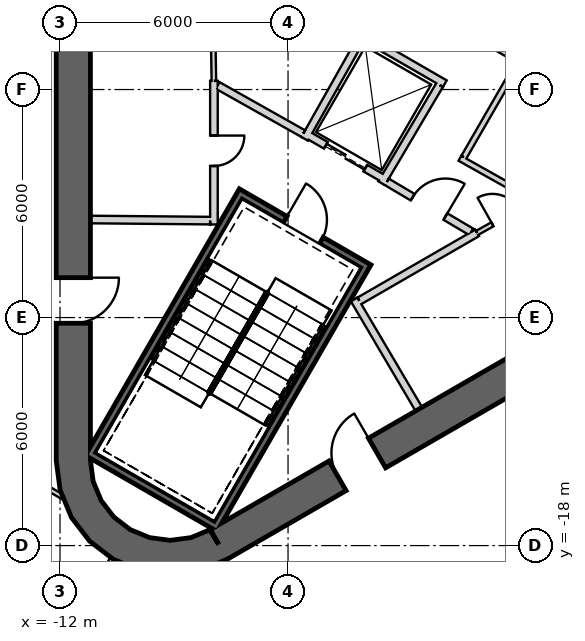
"""IFC4 building model, lengths in metres.
Left out: names, types, materials, properties, quantities, classifications, styles, units other than length and angle.
Written with IfcOpenShell. Run it as: python <this file> out.ifc"""

import sys

from ifc_helpers import new_model, si_unit, direction, frame, frame_2d, origin, place, context, subcontext, project, spatial, polyline, rectangle, outline, extrude, element, fill, save


model = new_model("IFC4")
c1 = context("Model", 3, precision=1e-05, world=origin(), true_north=direction((0.0, 1.0)))
c2 = subcontext(c1, "Body", "Model", "MODEL_VIEW")
j1 = project(units=[si_unit("LENGTHUNIT", "METRE"), si_unit("PLANEANGLEUNIT", "RADIAN")], contexts=[c1])
p1 = place(None, origin())
s1 = spatial("IfcSite", under=j1, at=p1, CompositionType="ELEMENT")
p2 = place(p1, origin())
s2 = spatial("IfcBuilding", under=s1, at=p2, CompositionType="ELEMENT")
p3 = place(p2, frame((0.0, 0.0, -5.5)))
s3 = spatial("IfcBuildingStorey", under=s2, at=p3, CompositionType="ELEMENT", Elevation=-5.5)
p4 = place(p3, frame((33.512, -16.71, 0.0), z_axis=(0.0, 0.0, 1.0), x_axis=(-0.865991212225, -0.500059216843, 0.0)))
e1 = element("IfcWall", 1, at=p4, inside=s3, PredefinedType="SHEAR", context=c2, shape_type="SweptSolid", body=[
    extrude(rectangle(XDim=41.333, YDim=1.0, at=frame_2d((20.667, 0.0))), origin(), (0.0, 0.0, 1.0), 5.5),
])
p5 = place(p3, frame((-11.65, 15.762, 0.0), z_axis=(0.0, 0.0, 1.0), x_axis=(0.0, -1.0, 0.0)))
e2 = element("IfcWall", 2, at=p5, inside=s3, PredefinedType="SHEAR", context=c2, shape_type="SweptSolid", body=[
    extrude(rectangle(XDim=31.523, YDim=0.9, at=frame_2d((15.762, 0.0))), origin(), (0.0, 0.0, 1.0), 5.5),
])
p6 = place(p5, frame((3.612, 0.0, 0.0)))
e3 = element("IfcOpeningElement", 3, at=p6, cuts=e2, PredefinedType="OPENING", context=c2, shape_type="SweptSolid", body=[
    extrude(rectangle(XDim=1.2, YDim=2.4, at=frame_2d((0.6, 1.2))), frame((0.0, 0.46, 0.0), z_axis=(0.0, -1.0, 0.0), x_axis=(1.0, 0.0, 0.0)), (0.0, 0.0, 1.0), 0.92),
])
p7 = place(p5, frame((26.712, 0.0, 0.0)))
e4 = element("IfcOpeningElement", 4, at=p7, cuts=e2, PredefinedType="OPENING", context=c2, shape_type="SweptSolid", body=[
    extrude(rectangle(XDim=1.2, YDim=2.4, at=frame_2d((0.6, 1.2))), frame((0.0, 0.46, 0.0), z_axis=(0.0, -1.0, 0.0), x_axis=(1.0, 0.0, 0.0)), (0.0, 0.0, 1.0), 0.92),
])
p8 = place(p3, frame((-7.825, -17.97, 0.0), z_axis=(0.0, 0.0, 1.0), x_axis=(0.866028369851, 0.499994862586, 0.0)))
e5 = element("IfcWall", 5, at=p8, inside=s3, PredefinedType="SHEAR", context=c2, shape_type="SweptSolid", body=[
    extrude(rectangle(XDim=31.523, YDim=0.9, at=frame_2d((15.762, 0.0))), origin(), (0.0, 0.0, 1.0), 5.5),
])
p9 = place(p8, frame((17.862, 0.0, 0.0)))
e6 = element("IfcOpeningElement", 6, at=p9, cuts=e5, PredefinedType="OPENING", context=c2, shape_type="SweptSolid", body=[
    extrude(rectangle(XDim=1.2, YDim=2.4, at=frame_2d((0.6, 1.2))), frame((0.0, 0.46, 0.0), z_axis=(0.0, -1.0, 0.0), x_axis=(1.0, 0.0, 0.0)), (0.0, 0.0, 1.0), 0.92),
])
p10 = place(p8, frame((20.562, 0.0, 0.0)))
e7 = element("IfcOpeningElement", 7, at=p10, cuts=e5, PredefinedType="OPENING", context=c2, shape_type="SweptSolid", body=[
    extrude(rectangle(XDim=1.2, YDim=2.4, at=frame_2d((0.6, 1.2))), frame((0.0, 0.46, 0.0), z_axis=(0.0, -1.0, 0.0), x_axis=(1.0, 0.0, 0.0)), (0.0, 0.0, 1.0), 0.92),
])
p11 = place(p8, frame((26.712, 0.0, 0.0)))
e8 = element("IfcOpeningElement", 8, at=p11, cuts=e5, PredefinedType="OPENING", context=c2, shape_type="SweptSolid", body=[
    extrude(rectangle(XDim=1.2, YDim=2.4, at=frame_2d((0.6, 1.2))), frame((0.0, 0.46, 0.0), z_axis=(0.0, -1.0, 0.0), x_axis=(1.0, 0.0, 0.0)), (0.0, 0.0, 1.0), 0.92),
])
p12 = place(p8, frame((3.612, 0.0, 0.0)))
e9 = element("IfcOpeningElement", 9, at=p12, cuts=e5, PredefinedType="OPENING", context=c2, shape_type="SweptSolid", body=[
    extrude(rectangle(XDim=1.2, YDim=2.4, at=frame_2d((0.6, 1.2))), frame((0.0, 0.46, 0.0), z_axis=(0.0, -1.0, 0.0), x_axis=(1.0, 0.0, 0.0)), (0.0, 0.0, 1.0), 0.92),
])
p13 = place(p3, origin())
e10 = element("IfcWall", 10, at=p13, inside=s3, PredefinedType="SHEAR", context=c2, shape_type="SweptSolid", body=[
    extrude(outline(polyline([(-12.1, -15.762), (-11.998, -16.538), (-11.698, -17.262), (-11.221, -17.883), (-10.6, -18.36), (-9.876, -18.659), (-9.1, -18.762), (-8.323, -18.659), (-7.6, -18.36), (-8.05, -17.58), (-8.556, -17.79), (-9.1, -17.862), (-9.644, -17.79), (-10.15, -17.58), (-10.585, -17.247), (-10.919, -16.812), (-11.128, -16.305), (-11.2, -15.762), (-12.1, -15.762)])), origin(), (0.0, 0.0, 1.0), 5.5),
])
p14 = place(p3, frame((-3.905, -10.563, -0.4), z_axis=(0.0, 0.0, 1.0), x_axis=(-0.500012932018, -0.866017937352, 0.0)))
e11 = element("IfcWall", 11, at=p14, inside=s3, PredefinedType="SHEAR", context=c2, shape_type="SweptSolid", body=[
    extrude(rectangle(XDim=8.1, YDim=0.2, at=frame_2d((4.05, 0.0))), origin(), (0.0, 0.0, 1.0), 5.5),
])
p15 = place(p3, frame((-11.282, -15.541, -0.4), z_axis=(0.0, 0.0, 1.0), x_axis=(0.866000483506, -0.500043160704, 0.0)))
e12 = element("IfcWall", 12, at=p15, inside=s3, PredefinedType="SHEAR", context=c2, shape_type="SweptSolid", body=[
    extrude(rectangle(XDim=3.8, YDim=0.2, at=frame_2d((1.9, 0.0))), origin(), (0.0, 0.0, 1.0), 5.5),
])
p16 = place(p3, frame((-7.196, -8.663, -0.4), z_axis=(0.0, 0.0, 1.0), x_axis=(-0.499997992926, -0.866026562566, 0.0)))
e13 = element("IfcWall", 13, at=p16, inside=s3, PredefinedType="SHEAR", context=c2, shape_type="SweptSolid", body=[
    extrude(rectangle(XDim=7.9, YDim=0.2, at=frame_2d((3.95, 0.0))), origin(), (0.0, 0.0, 1.0), 5.5),
])
p17 = place(p3, frame((-4.041, -10.599, -0.4), z_axis=(0.0, 0.0, 1.0), x_axis=(-0.866047807691, 0.499961193289, 0.0)))
e14 = element("IfcWall", 14, at=p17, inside=s3, PredefinedType="SHEAR", context=c2, shape_type="SweptSolid", body=[
    extrude(rectangle(XDim=3.6, YDim=0.2, at=frame_2d((1.8, 0.0))), origin(), (0.0, 0.0, 1.0), 5.5),
])
p18 = place(p17, frame((1.25, 0.0, 0.4)))
e15 = element("IfcOpeningElement", 15, at=p18, cuts=e14, PredefinedType="OPENING", context=c2, shape_type="SweptSolid", body=[
    extrude(rectangle(XDim=1.1, YDim=2.1, at=frame_2d((0.55, 1.05))), frame((0.0, 0.11, 0.0), z_axis=(0.0, -1.0, 0.0), x_axis=(1.0, 0.0, 0.0)), (0.0, 0.0, 1.0), 0.22),
])
p19 = place(p3, frame((-3.446, -8.368, 0.0), z_axis=(0.0, 0.0, 1.0), x_axis=(-0.866024647952, 0.500001309137, 0.0)))
e16 = element("IfcWall", 16, at=p19, inside=s3, PredefinedType="PLUMBINGWALL", context=c2, shape_type="SweptSolid", body=[
    extrude(rectangle(XDim=2.4, YDim=0.2, at=frame_2d((1.2, 0.0))), origin(), (0.0, 0.0, 1.0), 5.1),
])
p20 = place(p19, frame((0.6, 0.0, 0.0)))
e17 = element("IfcOpeningElement", 17, at=p20, cuts=e16, PredefinedType="OPENING", context=c2, shape_type="SweptSolid", body=[
    extrude(rectangle(XDim=1.2, YDim=2.4, at=frame_2d((0.6, 1.2))), frame((0.0, 0.11, 0.0), z_axis=(0.0, -1.0, 0.0), x_axis=(1.0, 0.0, 0.0)), (0.0, 0.0, 1.0), 0.22),
])
p21 = place(p3, frame((-5.562, -7.296, 0.0), z_axis=(0.0, 0.0, 1.0), x_axis=(0.491358283181, 0.870957540612, 0.0)))
e18 = element("IfcWall", 18, at=p21, inside=s3, PredefinedType="PLUMBINGWALL", context=c2, shape_type="SweptSolid", body=[
    extrude(rectangle(XDim=3.2, YDim=0.2, at=frame_2d((1.6, 0.0))), origin(), (0.0, 0.0, 1.0), 5.1),
])
p22 = place(p3, frame((-3.953, -4.646, 0.0), z_axis=(0.0, 0.0, 1.0), x_axis=(0.866024647952, -0.500001309137, 0.0)))
e19 = element("IfcWall", 19, at=p22, inside=s3, PredefinedType="PLUMBINGWALL", context=c2, shape_type="SweptSolid", body=[
    extrude(rectangle(XDim=2.4, YDim=0.2, at=frame_2d((1.2, 0.0))), origin(), (0.0, 0.0, 1.0), 5.1),
])
p23 = place(p3, frame((-2.012, -5.882, 0.0), z_axis=(0.0, 0.0, 1.0), x_axis=(-0.508619639323, -0.860991325447, 0.0)))
e20 = element("IfcWall", 20, at=p23, inside=s3, PredefinedType="PLUMBINGWALL", context=c2, shape_type="SweptSolid", body=[
    extrude(rectangle(XDim=3.0, YDim=0.2, at=frame_2d((1.5, 0.0))), origin(), (0.0, 0.0, 1.0), 5.1),
])
p24 = place(p3, frame((-7.95, -9.55, 0.0), z_axis=(0.0, 0.0, 1.0), x_axis=(0.0, 1.0, 0.0)))
e21 = element("IfcWall", 21, at=p24, inside=s3, PredefinedType="PARTITIONING", context=c2, shape_type="SweptSolid", body=[
    extrude(rectangle(XDim=3.778, YDim=0.2, at=frame_2d((1.889, 0.0))), origin(), (0.0, 0.0, 1.0), 5.1),
])
p25 = place(p24, frame((1.539, 0.0, 0.0)))
e22 = element("IfcOpeningElement", 22, at=p25, cuts=e21, PredefinedType="OPENING", context=c2, shape_type="SweptSolid", body=[
    extrude(rectangle(XDim=0.8, YDim=2.1, at=frame_2d((0.4, 1.05))), frame((0.0, 0.11, 0.0), z_axis=(0.0, -1.0, 0.0), x_axis=(1.0, 0.0, 0.0)), (0.0, 0.0, 1.0), 0.22),
])
p26 = place(p3, frame((-11.2, -9.42, 0.0), z_axis=(0.0, 0.0, 1.0), x_axis=(0.999957467379, -0.009222983926, 0.0)))
e23 = element("IfcWall", 23, at=p26, inside=s3, PredefinedType="PARTITIONING", context=c2, shape_type="SweptSolid", body=[
    extrude(rectangle(XDim=3.15, YDim=0.2, at=frame_2d((1.575, 0.0))), origin(), (0.0, 0.0, 1.0), 5.1),
])
p27 = place(p3, frame((-7.98, -4.05, 0.0), z_axis=(0.0, 0.0, 1.0), x_axis=(0.016723387416, -0.999860154378, 0.0)))
e24 = element("IfcWall", 24, at=p27, inside=s3, PredefinedType="PARTITIONING", context=c2, shape_type="SweptSolid", body=[
    extrude(rectangle(XDim=1.723, YDim=0.12, at=frame_2d((0.861, 0.0))), origin(), (0.0, 0.0, 1.0), 5.1),
])
p28 = place(p3, frame((-4.26, -11.524, 0.0), z_axis=(0.0, 0.0, 1.0), x_axis=(0.507997497166, -0.861358544901, 0.0)))
e25 = element("IfcWall", 25, at=p28, inside=s3, PredefinedType="PARTITIONING", context=c2, shape_type="SweptSolid", body=[
    extrude(rectangle(XDim=3.35, YDim=0.2, at=frame_2d((1.675, 0.0))), origin(), (0.0, 0.0, 1.0), 5.1),
])
p29 = place(p3, frame((-1.024, -9.771, 0.0), z_axis=(0.0, 0.0, 1.0), x_axis=(-0.866029903013, -0.499992207027, 0.0)))
e26 = element("IfcWall", 26, at=p29, inside=s3, PredefinedType="PARTITIONING", context=c2, shape_type="SweptSolid", body=[
    extrude(rectangle(XDim=3.578, YDim=0.2, at=frame_2d((1.789, 0.0))), origin(), (0.0, 0.0, 1.0), 5.1),
])
p30 = place(p3, frame((0.478, -8.928, 0.0), z_axis=(0.0, 0.0, 1.0), x_axis=(-0.871968924608, -0.489561226527, 0.0)))
e27 = element("IfcWall", 27, at=p30, inside=s3, PredefinedType="PARTITIONING", context=c2, shape_type="SweptSolid", body=[
    extrude(rectangle(XDim=1.722, YDim=0.12, at=frame_2d((0.861, 0.0))), origin(), (0.0, 0.0, 1.0), 5.1),
])
p31 = place(p30, frame((0.461, 0.0, 0.0)))
e28 = element("IfcOpeningElement", 28, at=p31, cuts=e27, PredefinedType="OPENING", context=c2, shape_type="SweptSolid", body=[
    extrude(rectangle(XDim=0.8, YDim=2.1, at=frame_2d((0.4, 1.05))), frame((0.0, 0.07, 0.0), z_axis=(0.0, -1.0, 0.0), x_axis=(1.0, 0.0, 0.0)), (0.0, 0.0, 1.0), 0.14),
])
p32 = place(p3, frame((-7.85, -5.893, 0.0), z_axis=(0.0, 0.0, 1.0), x_axis=(0.871350695252, -0.490660744185, 0.0)))
e29 = element("IfcWall", 29, at=p32, inside=s3, PredefinedType="PARTITIONING", context=c2, shape_type="SweptSolid", body=[
    extrude(rectangle(XDim=2.582, YDim=0.2, at=frame_2d((1.291, 0.0))), origin(), (0.0, 0.0, 1.0), 5.1),
])
p33 = place(p3, frame((-3.401, -8.43, 0.0), z_axis=(0.0, 0.0, 1.0), x_axis=(0.860630814782, -0.509229418482, 0.0)))
e30 = element("IfcWall", 30, at=p33, inside=s3, PredefinedType="PARTITIONING", context=c2, shape_type="SweptSolid", body=[
    extrude(rectangle(XDim=2.582, YDim=0.2, at=frame_2d((1.291, 0.0))), origin(), (0.0, 0.0, 1.0), 5.1),
])
p34 = place(p33, frame((0.791, 0.0, 0.0)))
e31 = element("IfcOpeningElement", 31, at=p34, cuts=e30, PredefinedType="OPENING", context=c2, shape_type="SweptSolid", body=[
    extrude(rectangle(XDim=1.0, YDim=2.1, at=frame_2d((0.5, 1.05))), frame((0.0, 0.11, 0.0), z_axis=(0.0, -1.0, 0.0), x_axis=(1.0, 0.0, 0.0)), (0.0, 0.0, 1.0), 0.22),
])
p35 = place(p3, frame((-1.477, -7.808, 0.0), z_axis=(0.0, 0.0, 1.0), x_axis=(0.871822901869, -0.48982122022, 0.0)))
e32 = element("IfcWall", 32, at=p35, inside=s3, PredefinedType="PLUMBINGWALL", context=c2, shape_type="SweptSolid", body=[
    extrude(rectangle(XDim=2.24, YDim=0.15, at=frame_2d((1.12, 0.0))), origin(), (0.0, 0.0, 1.0), 5.1),
])
p36 = place(p3, frame((0.126, -5.182, 0.0), z_axis=(0.0, 0.0, 1.0), x_axis=(-0.499990139034, -0.866031096941, 0.0)))
e33 = element("IfcWall", 33, at=p36, inside=s3, PredefinedType="PLUMBINGWALL", context=c2, shape_type="SweptSolid", body=[
    extrude(rectangle(XDim=3.0, YDim=0.15, at=frame_2d((1.5, 0.0))), origin(), (0.0, 0.0, 1.0), 5.1),
])
p37 = place(p3, frame((-1.514, -4.322, 0.0), z_axis=(0.0, 0.0, 1.0), x_axis=(0.866000072607, -0.50004387232, 0.0)))
e34 = element("IfcWall", 34, at=p37, inside=s3, PredefinedType="PLUMBINGWALL", context=c2, shape_type="SweptSolid", body=[
    extrude(rectangle(XDim=1.775, YDim=0.15, at=frame_2d((0.888, 0.0))), origin(), (0.0, 0.0, 1.0), 5.1),
])
p38 = place(p3, frame((-16.19, -28.077, 0.0), z_axis=(0.0, 0.0, 1.0), x_axis=(0.866271440356, 0.499573609816, 0.0)))
e35 = element("IfcWall", 35, at=p38, inside=s3, PredefinedType="PARTITIONING", context=c2, shape_type="SweptSolid", body=[
    extrude(rectangle(XDim=20.117, YDim=0.12, at=frame_2d((10.059, 0.0))), origin(), (0.0, 0.0, 1.0), 4.07),
])
p39 = place(p38, frame((9.397, 0.0, 0.0)))
e36 = element("IfcOpeningElement", 36, at=p39, cuts=e35, PredefinedType="OPENING", context=c2, shape_type="SweptSolid", body=[
    extrude(rectangle(XDim=1.0, YDim=2.1, at=frame_2d((0.5, 1.05))), frame((0.0, 0.07, 0.0), z_axis=(0.0, -1.0, 0.0), x_axis=(1.0, 0.0, 0.0)), (0.0, 0.0, 1.0), 0.14),
])
p40 = place(p38, frame((2.53, 0.0, 0.0)))
e37 = element("IfcOpeningElement", 37, at=p40, cuts=e35, PredefinedType="OPENING", context=c2, shape_type="SweptSolid", body=[
    extrude(rectangle(XDim=1.0, YDim=2.1, at=frame_2d((0.5, 1.05))), frame((0.0, 0.07, 0.0), z_axis=(0.0, -1.0, 0.0), x_axis=(1.0, 0.0, 0.0)), (0.0, 0.0, 1.0), 0.14),
])
p41 = place(p3, frame((-16.2, -14.226, 0.0), z_axis=(0.0, 0.0, 1.0), x_axis=(0.863501067027, -0.504347010741, 0.0)))
e38 = element("IfcWall", 38, at=p41, inside=s3, PredefinedType="PARTITIONING", context=c2, shape_type="SweptSolid", body=[
    extrude(rectangle(XDim=5.166, YDim=0.12, at=frame_2d((2.583, 0.0))), origin(), (0.0, 0.0, 1.0), 4.18),
])
p42 = place(p3, frame((-10.549, -18.212, 0.0), z_axis=(0.0, 0.0, 1.0), x_axis=(-0.500006121477, -0.866021869519, 0.0)))
e39 = element("IfcWall", 39, at=p42, inside=s3, PredefinedType="PARTITIONING", context=c2, shape_type="SweptSolid", body=[
    extrude(rectangle(XDim=4.42, YDim=0.12, at=frame_2d((2.21, 0.0))), origin(), (0.0, 0.0, 1.0), 4.07),
])
p43 = place(p18, origin())
e40 = element("IfcDoor", 40, at=p43, inside=s3, OperationType="SINGLE_SWING_RIGHT", PredefinedType="USERDEFINED", context=c2, shape_type="SweptSolid", body=[
    extrude(rectangle(XDim=1.1, YDim=2.1, at=frame_2d((0.55, 1.05))), frame((0.0, 0.025, 0.0), z_axis=(0.0, -1.0, 0.0), x_axis=(1.0, 0.0, 0.0)), (0.0, 0.0, 1.0), 0.05),
])
fill(e15, e40)
p44 = place(p34, origin())
e41 = element("IfcDoor", 41, at=p44, inside=s3, OperationType="SINGLE_SWING_RIGHT", PredefinedType="USERDEFINED", context=c2, shape_type="SweptSolid", body=[
    extrude(rectangle(XDim=1.0, YDim=2.1, at=frame_2d((0.5, 1.05))), frame((0.0, 0.025, 0.0), z_axis=(0.0, -1.0, 0.0), x_axis=(1.0, 0.0, 0.0)), (0.0, 0.0, 1.0), 0.05),
])
fill(e31, e41)
p45 = place(p20, origin())
e42 = element("IfcDoor", 42, at=p45, inside=s3, OperationType="SLIDING_TO_LEFT", PredefinedType="USERDEFINED", context=c2, shape_type="SweptSolid", body=[
    extrude(rectangle(XDim=1.2, YDim=2.4, at=frame_2d((0.6, 1.2))), frame((0.0, 0.025, 0.0), z_axis=(0.0, -1.0, 0.0), x_axis=(1.0, 0.0, 0.0)), (0.0, 0.0, 1.0), 0.05),
])
fill(e17, e42)
p46 = place(p25, origin())
e43 = element("IfcDoor", 43, at=p46, inside=s3, OperationType="SINGLE_SWING_RIGHT", PredefinedType="USERDEFINED", context=c2, shape_type="SweptSolid", body=[
    extrude(rectangle(XDim=0.8, YDim=2.1, at=frame_2d((0.4, 1.05))), frame((0.0, 0.025, 0.0), z_axis=(0.0, -1.0, 0.0), x_axis=(1.0, 0.0, 0.0)), (0.0, 0.0, 1.0), 0.05),
])
fill(e22, e43)
p47 = place(p31, origin())
e44 = element("IfcDoor", 44, at=p47, inside=s3, OperationType="SINGLE_SWING_RIGHT", PredefinedType="USERDEFINED", context=c2, shape_type="SweptSolid", body=[
    extrude(rectangle(XDim=0.8, YDim=2.1, at=frame_2d((0.4, 1.05))), frame((0.0, 0.025, 0.0), z_axis=(0.0, -1.0, 0.0), x_axis=(1.0, 0.0, 0.0)), (0.0, 0.0, 1.0), 0.05),
])
fill(e28, e44)
p48 = place(p7, origin())
e45 = element("IfcDoor", 45, at=p48, inside=s3, OperationType="SINGLE_SWING_LEFT", PredefinedType="USERDEFINED", context=c2, shape_type="SweptSolid", body=[
    extrude(rectangle(XDim=1.2, YDim=2.4, at=frame_2d((0.6, 1.2))), frame((0.0, 0.025, 0.0), z_axis=(0.0, -1.0, 0.0), x_axis=(1.0, 0.0, 0.0)), (0.0, 0.0, 1.0), 0.05),
])
fill(e4, e45)
p49 = place(p12, origin())
e46 = element("IfcDoor", 46, at=p49, inside=s3, OperationType="SINGLE_SWING_RIGHT", PredefinedType="USERDEFINED", context=c2, shape_type="SweptSolid", body=[
    extrude(rectangle(XDim=1.2, YDim=2.4, at=frame_2d((0.6, 1.2))), frame((0.0, 0.025, 0.0), z_axis=(0.0, -1.0, 0.0), x_axis=(1.0, 0.0, 0.0)), (0.0, 0.0, 1.0), 0.05),
])
fill(e9, e46)
save(model, sys.argv[1])
